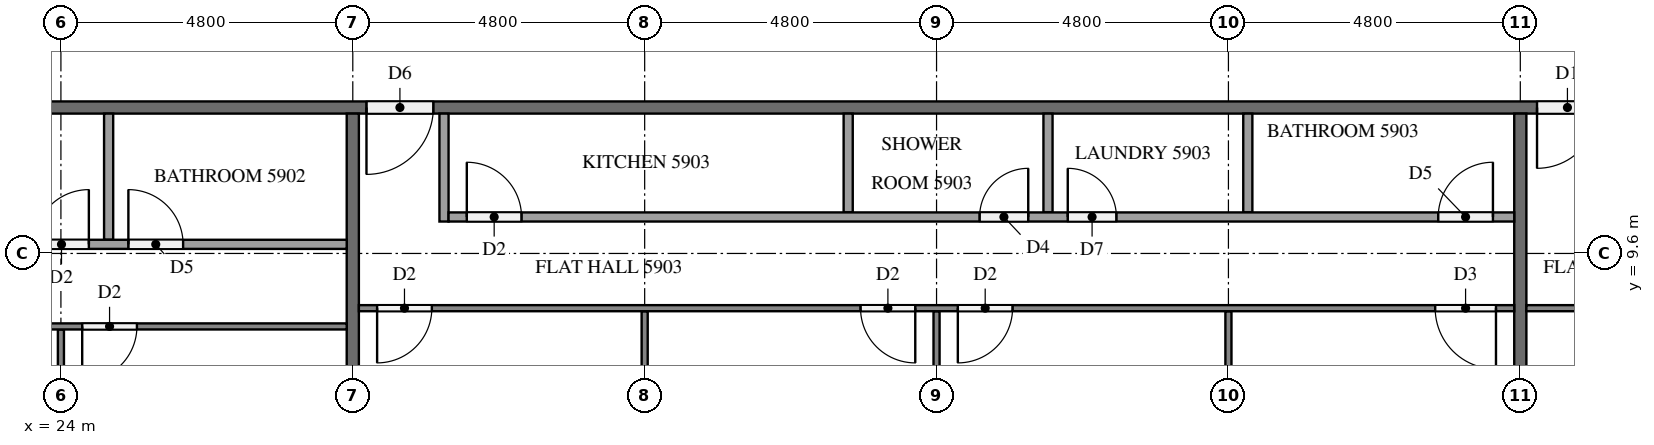
"""IFC4 building model, lengths in metres.
Left out: names, types, materials, properties, quantities, classifications, styles, units other than length and angle.
Written with IfcOpenShell. Run it as: python <this file> out.ifc"""

import sys

from ifc_helpers import new_model, si_unit, direction, frame, frame_2d, origin, place, context, subcontext, project, spatial, rectangle, extrude, element, fill, save


model = new_model("IFC4")
c1 = context("Model", 3, precision=1e-05, world=origin(), true_north=direction((0.0, 1.0)))
c2 = subcontext(c1, "Body", "Model", "MODEL_VIEW")
j1 = project(units=[si_unit("LENGTHUNIT", "METRE"), si_unit("PLANEANGLEUNIT", "RADIAN")], contexts=[c1])
p1 = place(None, origin())
s1 = spatial("IfcSite", under=j1, at=p1, CompositionType="ELEMENT")
p2 = place(p1, origin())
s2 = spatial("IfcBuilding", under=s1, at=p2, CompositionType="ELEMENT")
p3 = place(p2, frame((0.0, 0.0, 226.3)))
s3 = spatial("IfcBuildingStorey", under=s2, at=p3, CompositionType="ELEMENT", Elevation=226.3)
p4 = place(p3, frame((50.5, 12.0, 0.0), z_axis=(0.0, 0.0, 1.0), x_axis=(-1.0, 0.0, 0.0)))
e1 = element("IfcWall", 1, at=p4, inside=s3, PredefinedType="PARTITIONING", context=c2, shape_type="SweptSolid", body=[
    extrude(rectangle(XDim=38.6, YDim=0.2, at=frame_2d((19.3, 0.0))), origin(), (0.0, 0.0, 1.0), 3.2),
])
p5 = place(p4, frame((36.375, 0.0, 0.0)))
e2 = element("IfcOpeningElement", 2, at=p5, cuts=e1, PredefinedType="OPENING", context=c2, shape_type="SweptSolid", body=[
    extrude(rectangle(XDim=1.0, YDim=2.1, at=frame_2d((0.5, 1.05))), frame((0.0, 0.11, 0.0), z_axis=(0.0, -1.0, 0.0), x_axis=(1.0, 0.0, 0.0)), (0.0, 0.0, 1.0), 0.22),
])
p6 = place(p4, frame((34.825, 0.0, 0.0)))
e3 = element("IfcOpeningElement", 3, at=p6, cuts=e1, PredefinedType="OPENING", context=c2, shape_type="SweptSolid", body=[
    extrude(rectangle(XDim=1.0, YDim=2.1, at=frame_2d((0.5, 1.05))), frame((0.0, 0.11, 0.0), z_axis=(0.0, -1.0, 0.0), x_axis=(1.0, 0.0, 0.0)), (0.0, 0.0, 1.0), 0.22),
])
p7 = place(p4, frame((20.375, 0.0, 0.0)))
e4 = element("IfcOpeningElement", 4, at=p7, cuts=e1, PredefinedType="OPENING", context=c2, shape_type="SweptSolid", body=[
    extrude(rectangle(XDim=1.1, YDim=2.1, at=frame_2d((0.55, 1.05))), frame((0.0, 0.11, 0.0), z_axis=(0.0, -1.0, 0.0), x_axis=(1.0, 0.0, 0.0)), (0.0, 0.0, 1.0), 0.22),
])
p8 = place(p4, frame((1.225, 0.0, 0.0)))
e5 = element("IfcOpeningElement", 5, at=p8, cuts=e1, PredefinedType="OPENING", context=c2, shape_type="SweptSolid", body=[
    extrude(rectangle(XDim=1.0, YDim=2.1, at=frame_2d((0.5, 1.05))), frame((0.0, 0.11, 0.0), z_axis=(0.0, -1.0, 0.0), x_axis=(1.0, 0.0, 0.0)), (0.0, 0.0, 1.0), 0.22),
])
for number, where, z_axis, x_axis in (
    (6, (28.8, 11.9, 0.0), (0.0, 0.0, 1.0), (0.0, -1.0, 0.0)),
    (7, (48.0, 11.9, 0.0), (0.0, 0.0, 1.0), (0.0, -1.0, 0.0)),
):
    element("IfcWall", number, at=place(p3, frame(where, z_axis=z_axis, x_axis=x_axis)), inside=s3, PredefinedType="PARTITIONING", context=c2, shape_type="SweptSolid", body=[
        extrude(rectangle(XDim=6.775, YDim=0.2, at=frame_2d((3.387, 0.0))), origin(), (0.0, 0.0, 1.0), 3.2),
    ])
p9 = place(p3, frame((24.0, 8.35, 0.0), z_axis=(0.0, 0.0, 1.0), x_axis=(0.0, -1.0, 0.0)))
e8 = element("IfcWall", 8, at=p9, inside=s3, PredefinedType="PARTITIONING", context=c2, shape_type="SweptSolid", body=[
    extrude(rectangle(XDim=3.45, YDim=0.1, at=frame_2d((1.725, 0.0))), origin(), (0.0, 0.0, 1.0), 3.2),
])
p10 = place(p3, frame((28.7, 8.4, 0.0), z_axis=(0.0, 0.0, 1.0), x_axis=(-1.0, 0.0, 0.0)))
e9 = element("IfcWall", 9, at=p10, inside=s3, PredefinedType="PARTITIONING", context=c2, shape_type="SweptSolid", body=[
    extrude(rectangle(XDim=14.2, YDim=0.1, at=frame_2d((7.1, 0.0))), origin(), (0.0, 0.0, 1.0), 3.2),
])
p11 = place(p10, frame((12.9, 0.0, 0.0)))
e10 = element("IfcOpeningElement", 10, at=p11, cuts=e9, PredefinedType="OPENING", context=c2, shape_type="SweptSolid", body=[
    extrude(rectangle(XDim=1.0, YDim=2.1, at=frame_2d((0.5, 1.05))), frame((0.0, 0.06, 0.0), z_axis=(0.0, -1.0, 0.0), x_axis=(1.0, 0.0, 0.0)), (0.0, 0.0, 1.0), 0.12),
])
p12 = place(p10, frame((5.05, 0.0, 0.0)))
e11 = element("IfcOpeningElement", 11, at=p12, cuts=e9, PredefinedType="OPENING", context=c2, shape_type="SweptSolid", body=[
    extrude(rectangle(XDim=0.9, YDim=2.1, at=frame_2d((0.45, 1.05))), frame((0.0, 0.06, 0.0), z_axis=(0.0, -1.0, 0.0), x_axis=(1.0, 0.0, 0.0)), (0.0, 0.0, 1.0), 0.12),
])
p13 = place(p10, frame((3.45, 0.0, 0.0)))
e12 = element("IfcOpeningElement", 12, at=p13, cuts=e9, PredefinedType="OPENING", context=c2, shape_type="SweptSolid", body=[
    extrude(rectangle(XDim=0.9, YDim=2.1, at=frame_2d((0.45, 1.05))), frame((0.0, 0.06, 0.0), z_axis=(0.0, -1.0, 0.0), x_axis=(1.0, 0.0, 0.0)), (0.0, 0.0, 1.0), 0.12),
])
p14 = place(p3, frame((24.785, 11.9, 0.0), z_axis=(0.0, 0.0, 1.0), x_axis=(0.0, -1.0, 0.0)))
e13 = element("IfcWall", 13, at=p14, inside=s3, PredefinedType="PARTITIONING", context=c2, shape_type="SweptSolid", body=[
    extrude(rectangle(XDim=2.075, YDim=0.15, at=frame_2d((1.038, 0.0))), origin(), (0.0, 0.0, 1.0), 3.2),
])
p15 = place(p3, frame((15.975, 9.75, 0.0), z_axis=(0.0, 0.0, 1.0), x_axis=(1.0, 0.0, 0.0)))
e14 = element("IfcWall", 14, at=p15, inside=s3, PredefinedType="PARTITIONING", context=c2, shape_type="SweptSolid", body=[
    extrude(rectangle(XDim=12.725, YDim=0.15, at=frame_2d((6.362, 0.0))), origin(), (0.0, 0.0, 1.0), 3.2),
])
p16 = place(p15, frame((0.3, 0.0, 0.0)))
e15 = element("IfcOpeningElement", 15, at=p16, cuts=e14, PredefinedType="OPENING", context=c2, shape_type="SweptSolid", body=[
    extrude(rectangle(XDim=0.8, YDim=2.1, at=frame_2d((0.4, 1.05))), frame((0.0, 0.085, 0.0), z_axis=(0.0, -1.0, 0.0), x_axis=(1.0, 0.0, 0.0)), (0.0, 0.0, 1.0), 0.17),
])
p17 = place(p15, frame((7.585, 0.0, 0.0)))
e16 = element("IfcOpeningElement", 16, at=p17, cuts=e14, PredefinedType="OPENING", context=c2, shape_type="SweptSolid", body=[
    extrude(rectangle(XDim=0.9, YDim=2.1, at=frame_2d((0.45, 1.05))), frame((0.0, 0.085, 0.0), z_axis=(0.0, -1.0, 0.0), x_axis=(1.0, 0.0, 0.0)), (0.0, 0.0, 1.0), 0.17),
])
p18 = place(p15, frame((9.135, 0.0, 0.0)))
e17 = element("IfcOpeningElement", 17, at=p18, cuts=e14, PredefinedType="OPENING", context=c2, shape_type="SweptSolid", body=[
    extrude(rectangle(XDim=0.9, YDim=2.1, at=frame_2d((0.45, 1.05))), frame((0.0, 0.085, 0.0), z_axis=(0.0, -1.0, 0.0), x_axis=(1.0, 0.0, 0.0)), (0.0, 0.0, 1.0), 0.17),
])
p19 = place(p3, frame((33.6, 8.65, 0.0), z_axis=(0.0, 0.0, 1.0), x_axis=(0.0, -1.0, 0.0)))
e18 = element("IfcWall", 18, at=p19, inside=s3, PredefinedType="PARTITIONING", context=c2, shape_type="SweptSolid", body=[
    extrude(rectangle(XDim=3.75, YDim=0.1, at=frame_2d((1.875, 0.0))), origin(), (0.0, 0.0, 1.0), 3.2),
])
p20 = place(p3, frame((38.4, 8.65, 0.0), z_axis=(0.0, 0.0, 1.0), x_axis=(0.0, -1.0, 0.0)))
e19 = element("IfcWall", 19, at=p20, inside=s3, PredefinedType="PARTITIONING", context=c2, shape_type="SweptSolid", body=[
    extrude(rectangle(XDim=3.525, YDim=0.1, at=frame_2d((1.762, 0.0))), origin(), (0.0, 0.0, 1.0), 3.2),
])
p21 = place(p3, frame((43.2, 8.65, 0.0), z_axis=(0.0, 0.0, 1.0), x_axis=(0.0, -1.0, 0.0)))
e20 = element("IfcWall", 20, at=p21, inside=s3, PredefinedType="PARTITIONING", context=c2, shape_type="SweptSolid", body=[
    extrude(rectangle(XDim=3.75, YDim=0.1, at=frame_2d((1.875, 0.0))), origin(), (0.0, 0.0, 1.0), 3.2),
])
p22 = place(p3, frame((47.9, 8.7, 0.0), z_axis=(0.0, 0.0, 1.0), x_axis=(-1.0, 0.0, 0.0)))
e21 = element("IfcWall", 21, at=p22, inside=s3, PredefinedType="PARTITIONING", context=c2, shape_type="SweptSolid", body=[
    extrude(rectangle(XDim=19.0, YDim=0.1, at=frame_2d((9.5, 0.0))), origin(), (0.0, 0.0, 1.0), 3.2),
])
p23 = place(p22, frame((17.8, 0.0, 0.0)))
e22 = element("IfcOpeningElement", 22, at=p23, cuts=e21, PredefinedType="OPENING", context=c2, shape_type="SweptSolid", body=[
    extrude(rectangle(XDim=0.9, YDim=2.1, at=frame_2d((0.45, 1.05))), frame((0.0, 0.06, 0.0), z_axis=(0.0, -1.0, 0.0), x_axis=(1.0, 0.0, 0.0)), (0.0, 0.0, 1.0), 0.12),
])
p24 = place(p22, frame((9.85, 0.0, 0.0)))
e23 = element("IfcOpeningElement", 23, at=p24, cuts=e21, PredefinedType="OPENING", context=c2, shape_type="SweptSolid", body=[
    extrude(rectangle(XDim=0.9, YDim=2.1, at=frame_2d((0.45, 1.05))), frame((0.0, 0.06, 0.0), z_axis=(0.0, -1.0, 0.0), x_axis=(1.0, 0.0, 0.0)), (0.0, 0.0, 1.0), 0.12),
])
p25 = place(p22, frame((8.25, 0.0, 0.0)))
e24 = element("IfcOpeningElement", 24, at=p25, cuts=e21, PredefinedType="OPENING", context=c2, shape_type="SweptSolid", body=[
    extrude(rectangle(XDim=0.9, YDim=2.1, at=frame_2d((0.45, 1.05))), frame((0.0, 0.06, 0.0), z_axis=(0.0, -1.0, 0.0), x_axis=(1.0, 0.0, 0.0)), (0.0, 0.0, 1.0), 0.12),
])
p26 = place(p22, frame((0.3, 0.0, 0.0)))
e25 = element("IfcOpeningElement", 25, at=p26, cuts=e21, PredefinedType="OPENING", context=c2, shape_type="SweptSolid", body=[
    extrude(rectangle(XDim=1.0, YDim=2.1, at=frame_2d((0.5, 1.05))), frame((0.0, 0.06, 0.0), z_axis=(0.0, -1.0, 0.0), x_axis=(1.0, 0.0, 0.0)), (0.0, 0.0, 1.0), 0.12),
])
for number, where, z_axis, x_axis in (
    (26, (36.947, 11.9, 0.0), (0.0, 0.0, 1.0), (0.0, -1.0, 0.0)),
    (27, (40.233, 11.9, 0.0), (0.0, 0.0, 1.0), (0.0, -1.0, 0.0)),
    (28, (43.519, 11.9, 0.0), (0.0, 0.0, 1.0), (0.0, -1.0, 0.0)),
):
    element("IfcWall", number, at=place(p3, frame(where, z_axis=z_axis, x_axis=x_axis)), inside=s3, PredefinedType="PARTITIONING", context=c2, shape_type="SweptSolid", body=[
        extrude(rectangle(XDim=1.625, YDim=0.15, at=frame_2d((0.812, 0.0))), origin(), (0.0, 0.0, 1.0), 3.2),
    ])
p27 = place(p3, frame((30.3, 11.9, 0.0), z_axis=(0.0, 0.0, 1.0), x_axis=(0.0, -1.0, 0.0)))
e29 = element("IfcWall", 29, at=p27, inside=s3, PredefinedType="PARTITIONING", context=c2, shape_type="SweptSolid", body=[
    extrude(rectangle(XDim=1.775, YDim=0.15, at=frame_2d((0.887, 0.0))), origin(), (0.0, 0.0, 1.0), 3.2),
])
p28 = place(p3, frame((30.375, 10.2, 0.0), z_axis=(0.0, 0.0, 1.0), x_axis=(1.0, 0.0, 0.0)))
e30 = element("IfcWall", 30, at=p28, inside=s3, PredefinedType="PARTITIONING", context=c2, shape_type="SweptSolid", body=[
    extrude(rectangle(XDim=17.525, YDim=0.15, at=frame_2d((8.762, 0.0))), origin(), (0.0, 0.0, 1.0), 3.2),
])
p29 = place(p28, frame((0.3, 0.0, 0.0)))
e31 = element("IfcOpeningElement", 31, at=p29, cuts=e30, PredefinedType="OPENING", context=c2, shape_type="SweptSolid", body=[
    extrude(rectangle(XDim=0.9, YDim=2.1, at=frame_2d((0.45, 1.05))), frame((0.0, 0.085, 0.0), z_axis=(0.0, -1.0, 0.0), x_axis=(1.0, 0.0, 0.0)), (0.0, 0.0, 1.0), 0.17),
])
p30 = place(p28, frame((8.733, 0.0, 0.0)))
e32 = element("IfcOpeningElement", 32, at=p30, cuts=e30, PredefinedType="OPENING", context=c2, shape_type="SweptSolid", body=[
    extrude(rectangle(XDim=0.8, YDim=2.1, at=frame_2d((0.4, 1.05))), frame((0.0, 0.085, 0.0), z_axis=(0.0, -1.0, 0.0), x_axis=(1.0, 0.0, 0.0)), (0.0, 0.0, 1.0), 0.17),
])
p31 = place(p28, frame((10.183, 0.0, 0.0)))
e33 = element("IfcOpeningElement", 33, at=p31, cuts=e30, PredefinedType="OPENING", context=c2, shape_type="SweptSolid", body=[
    extrude(rectangle(XDim=0.8, YDim=2.1, at=frame_2d((0.4, 1.05))), frame((0.0, 0.085, 0.0), z_axis=(0.0, -1.0, 0.0), x_axis=(1.0, 0.0, 0.0)), (0.0, 0.0, 1.0), 0.17),
])
p32 = place(p28, frame((16.275, 0.0, 0.0)))
e34 = element("IfcOpeningElement", 34, at=p32, cuts=e30, PredefinedType="OPENING", context=c2, shape_type="SweptSolid", body=[
    extrude(rectangle(XDim=0.9, YDim=2.1, at=frame_2d((0.45, 1.05))), frame((0.0, 0.085, 0.0), z_axis=(0.0, -1.0, 0.0), x_axis=(1.0, 0.0, 0.0)), (0.0, 0.0, 1.0), 0.17),
])
p33 = place(p3, frame((62.059, 8.7, 0.0), z_axis=(0.0, 0.0, 1.0), x_axis=(-1.0, 0.0, 0.0)))
e35 = element("IfcWall", 35, at=p33, inside=s3, PredefinedType="PARTITIONING", context=c2, shape_type="SweptSolid", body=[
    extrude(rectangle(XDim=13.959, YDim=0.1, at=frame_2d((6.979, 0.0))), origin(), (0.0, 0.0, 1.0), 3.2),
])
p34 = place(p33, frame((9.609, 0.0, 0.0)))
e36 = element("IfcOpeningElement", 36, at=p34, cuts=e35, PredefinedType="OPENING", context=c2, shape_type="SweptSolid", body=[
    extrude(rectangle(XDim=1.0, YDim=2.1, at=frame_2d((0.5, 1.05))), frame((0.0, 0.06, 0.0), z_axis=(0.0, -1.0, 0.0), x_axis=(1.0, 0.0, 0.0)), (0.0, 0.0, 1.0), 0.12),
])
p35 = place(p33, frame((8.009, 0.0, 0.0)))
e37 = element("IfcOpeningElement", 37, at=p35, cuts=e35, PredefinedType="OPENING", context=c2, shape_type="SweptSolid", body=[
    extrude(rectangle(XDim=0.9, YDim=2.1, at=frame_2d((0.45, 1.05))), frame((0.0, 0.06, 0.0), z_axis=(0.0, -1.0, 0.0), x_axis=(1.0, 0.0, 0.0)), (0.0, 0.0, 1.0), 0.12),
])
p36 = place(p33, frame((0.3, 0.0, 0.0)))
e38 = element("IfcOpeningElement", 38, at=p36, cuts=e35, PredefinedType="OPENING", context=c2, shape_type="SweptSolid", body=[
    extrude(rectangle(XDim=0.9, YDim=2.1, at=frame_2d((0.45, 1.05))), frame((0.0, 0.06, 0.0), z_axis=(0.0, -1.0, 0.0), x_axis=(1.0, 0.0, 0.0)), (0.0, 0.0, 1.0), 0.12),
])
p37 = place(p7, origin())
e39 = element("IfcDoor", 39, at=p37, inside=s3, OperationType="SINGLE_SWING_RIGHT", PredefinedType="DOOR", context=c2, shape_type="SweptSolid", body=[
    extrude(rectangle(XDim=1.1, YDim=2.1, at=frame_2d((0.55, 1.05))), frame((0.0, 0.025, 0.0), z_axis=(0.0, -1.0, 0.0), x_axis=(1.0, 0.0, 0.0)), (0.0, 0.0, 1.0), 0.05),
])
fill(e4, e39)
p38 = place(p8, origin())
e40 = element("IfcDoor", 40, at=p38, inside=s3, OperationType="SINGLE_SWING_RIGHT", PredefinedType="DOOR", context=c2, shape_type="SweptSolid", body=[
    extrude(rectangle(XDim=1.0, YDim=2.1, at=frame_2d((0.5, 1.05))), frame((0.0, 0.025, 0.0), z_axis=(0.0, -1.0, 0.0), x_axis=(1.0, 0.0, 0.0)), (0.0, 0.0, 1.0), 0.05),
])
fill(e5, e40)
p39 = place(p13, origin())
e41 = element("IfcDoor", 41, at=p39, inside=s3, OperationType="SINGLE_SWING_RIGHT", PredefinedType="DOOR", context=c2, shape_type="SweptSolid", body=[
    extrude(rectangle(XDim=0.9, YDim=2.1, at=frame_2d((0.45, 1.05))), frame((0.0, 0.025, 0.0), z_axis=(0.0, -1.0, 0.0), x_axis=(1.0, 0.0, 0.0)), (0.0, 0.0, 1.0), 0.05),
])
fill(e12, e41)
p40 = place(p17, origin())
e42 = element("IfcDoor", 42, at=p40, inside=s3, OperationType="SINGLE_SWING_RIGHT", PredefinedType="DOOR", context=c2, shape_type="SweptSolid", body=[
    extrude(rectangle(XDim=0.9, YDim=2.1, at=frame_2d((0.45, 1.05))), frame((0.0, 0.025, 0.0), z_axis=(0.0, -1.0, 0.0), x_axis=(1.0, 0.0, 0.0)), (0.0, 0.0, 1.0), 0.05),
])
fill(e16, e42)
p41 = place(p18, origin())
e43 = element("IfcDoor", 43, at=p41, inside=s3, OperationType="SINGLE_SWING_LEFT", PredefinedType="DOOR", context=c2, shape_type="SweptSolid", body=[
    extrude(rectangle(XDim=0.9, YDim=2.1, at=frame_2d((0.45, 1.05))), frame((0.0, 0.025, 0.0), z_axis=(0.0, -1.0, 0.0), x_axis=(1.0, 0.0, 0.0)), (0.0, 0.0, 1.0), 0.05),
])
fill(e17, e43)
p42 = place(p23, origin())
e44 = element("IfcDoor", 44, at=p42, inside=s3, OperationType="SINGLE_SWING_RIGHT", PredefinedType="DOOR", context=c2, shape_type="SweptSolid", body=[
    extrude(rectangle(XDim=0.9, YDim=2.1, at=frame_2d((0.45, 1.05))), frame((0.0, 0.025, 0.0), z_axis=(0.0, -1.0, 0.0), x_axis=(1.0, 0.0, 0.0)), (0.0, 0.0, 1.0), 0.05),
])
fill(e22, e44)
p43 = place(p24, origin())
e45 = element("IfcDoor", 45, at=p43, inside=s3, OperationType="SINGLE_SWING_LEFT", PredefinedType="DOOR", context=c2, shape_type="SweptSolid", body=[
    extrude(rectangle(XDim=0.9, YDim=2.1, at=frame_2d((0.45, 1.05))), frame((0.0, 0.025, 0.0), z_axis=(0.0, -1.0, 0.0), x_axis=(1.0, 0.0, 0.0)), (0.0, 0.0, 1.0), 0.05),
])
fill(e23, e45)
p44 = place(p25, origin())
e46 = element("IfcDoor", 46, at=p44, inside=s3, OperationType="SINGLE_SWING_RIGHT", PredefinedType="DOOR", context=c2, shape_type="SweptSolid", body=[
    extrude(rectangle(XDim=0.9, YDim=2.1, at=frame_2d((0.45, 1.05))), frame((0.0, 0.025, 0.0), z_axis=(0.0, -1.0, 0.0), x_axis=(1.0, 0.0, 0.0)), (0.0, 0.0, 1.0), 0.05),
])
fill(e24, e46)
p45 = place(p26, origin())
e47 = element("IfcDoor", 47, at=p45, inside=s3, OperationType="SINGLE_SWING_LEFT", PredefinedType="DOOR", context=c2, shape_type="SweptSolid", body=[
    extrude(rectangle(XDim=1.0, YDim=2.1, at=frame_2d((0.5, 1.05))), frame((0.0, 0.025, 0.0), z_axis=(0.0, -1.0, 0.0), x_axis=(1.0, 0.0, 0.0)), (0.0, 0.0, 1.0), 0.05),
])
fill(e25, e47)
p46 = place(p29, origin())
e48 = element("IfcDoor", 48, at=p46, inside=s3, OperationType="SINGLE_SWING_LEFT", PredefinedType="DOOR", context=c2, shape_type="SweptSolid", body=[
    extrude(rectangle(XDim=0.9, YDim=2.1, at=frame_2d((0.45, 1.05))), frame((0.0, 0.025, 0.0), z_axis=(0.0, -1.0, 0.0), x_axis=(1.0, 0.0, 0.0)), (0.0, 0.0, 1.0), 0.05),
])
fill(e31, e48)
p47 = place(p30, origin())
e49 = element("IfcDoor", 49, at=p47, inside=s3, OperationType="SINGLE_SWING_RIGHT", PredefinedType="DOOR", context=c2, shape_type="SweptSolid", body=[
    extrude(rectangle(XDim=0.8, YDim=2.1, at=frame_2d((0.4, 1.05))), frame((0.0, 0.025, 0.0), z_axis=(0.0, -1.0, 0.0), x_axis=(1.0, 0.0, 0.0)), (0.0, 0.0, 1.0), 0.05),
])
fill(e32, e49)
p48 = place(p31, origin())
e50 = element("IfcDoor", 50, at=p48, inside=s3, OperationType="SINGLE_SWING_LEFT", PredefinedType="DOOR", context=c2, shape_type="SweptSolid", body=[
    extrude(rectangle(XDim=0.8, YDim=2.1, at=frame_2d((0.4, 1.05))), frame((0.0, 0.025, 0.0), z_axis=(0.0, -1.0, 0.0), x_axis=(1.0, 0.0, 0.0)), (0.0, 0.0, 1.0), 0.05),
])
fill(e33, e50)
p49 = place(p32, origin())
e51 = element("IfcDoor", 51, at=p49, inside=s3, OperationType="SINGLE_SWING_RIGHT", PredefinedType="DOOR", context=c2, shape_type="SweptSolid", body=[
    extrude(rectangle(XDim=0.9, YDim=2.1, at=frame_2d((0.45, 1.05))), frame((0.0, 0.025, 0.0), z_axis=(0.0, -1.0, 0.0), x_axis=(1.0, 0.0, 0.0)), (0.0, 0.0, 1.0), 0.05),
])
fill(e34, e51)
save(model, sys.argv[1])
